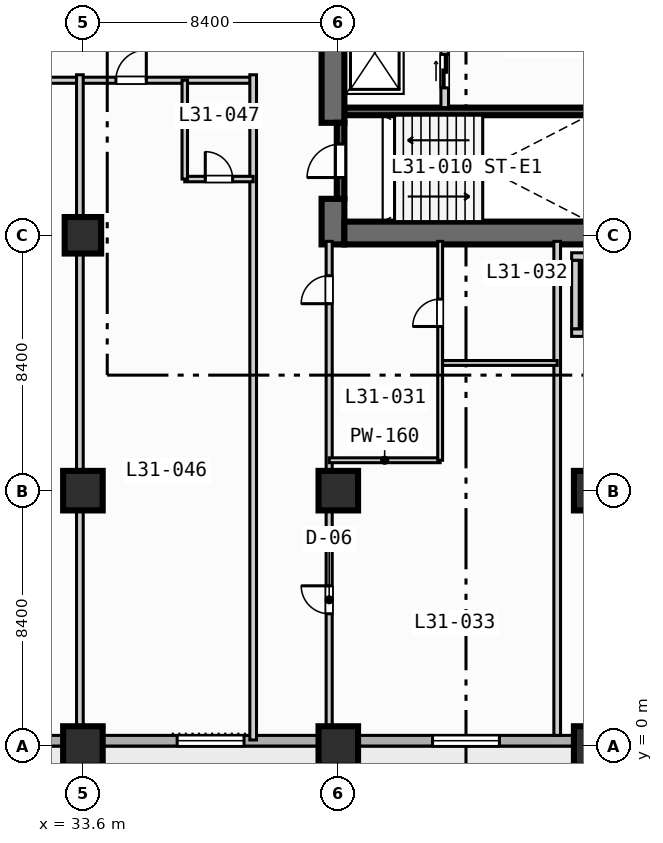
"""IFC4 building model, lengths in metres.
Left out: names, types, materials, properties, quantities, classifications, styles, units other than length and angle.
Written with IfcOpenShell. Run it as: python <this file> out.ifc"""

import sys

from ifc_helpers import new_model, si_unit, direction, frame, frame_2d, origin, origin_2d, place, context, subcontext, project, spatial, rectangle, extrude, element, fill, save


model = new_model("IFC4")
c1 = context("Model", 3, precision=1e-05, world=origin(), true_north=direction((0.0, 1.0)))
c2 = subcontext(c1, "Body", "Model", "MODEL_VIEW")
j1 = project(units=[si_unit("LENGTHUNIT", "METRE"), si_unit("PLANEANGLEUNIT", "RADIAN")], contexts=[c1])
p1 = place(None, origin())
s1 = spatial("IfcSite", under=j1, at=p1, CompositionType="ELEMENT")
p2 = place(p1, origin())
s2 = spatial("IfcBuilding", under=s1, at=p2, CompositionType="ELEMENT")
p3 = place(p2, frame((0.0, 0.0, 130.4)))
s3 = spatial("IfcBuildingStorey", under=s2, at=p3, CompositionType="ELEMENT", Elevation=130.4)
p4 = place(p3, frame((42.2, 20.875, 0.0), z_axis=(0.0, 0.0, 1.0), x_axis=(1.0, 0.0, 0.0)))
e1 = element("IfcWall", 1, at=p4, inside=s3, PredefinedType="SOLIDWALL", context=c2, shape_type="SweptSolid", body=[
    extrude(rectangle(XDim=8.05, YDim=0.25, at=frame_2d((4.025, 0.0))), origin(), (0.0, 0.0, 1.0), 3.55),
])
p5 = place(p3, frame((41.825, 16.5, 0.0), z_axis=(0.0, 0.0, 1.0), x_axis=(0.0, 1.0, 0.0)))
e2 = element("IfcWall", 2, at=p5, inside=s3, PredefinedType="SHEAR", context=c2, shape_type="SweptSolid", body=[
    extrude(rectangle(XDim=1.5, YDim=0.75, at=frame_2d((0.75, 0.0))), origin(), (0.0, 0.0, 1.0), 3.55),
])
p6 = place(p3, frame((41.825, 20.5, 0.0), z_axis=(0.0, 0.0, 1.0), x_axis=(0.0, 1.0, 0.0)))
e3 = element("IfcWall", 3, at=p6, inside=s3, PredefinedType="SHEAR", context=c2, shape_type="SweptSolid", body=[
    extrude(rectangle(XDim=5.075, YDim=0.75, at=frame_2d((2.538, 0.0))), origin(), (0.0, 0.0, 1.0), 3.55),
])
p7 = place(p3, frame((42.2, 16.875, 0.0), z_axis=(0.0, 0.0, 1.0), x_axis=(1.0, 0.0, 0.0)))
e4 = element("IfcWall", 4, at=p7, inside=s3, PredefinedType="SHEAR", context=c2, shape_type="SweptSolid", body=[
    extrude(rectangle(XDim=16.35, YDim=0.75, at=frame_2d((8.175, 0.0))), origin(), (0.0, 0.0, 1.0), 3.55),
])
for number, where, z_axis, x_axis in (
    (5, (33.6, 0.0, 0.0), (0.0, 0.0, 1.0), (1.0, 0.0, 0.0)),
    (6, (33.6, 8.4, 0.0), (0.0, 0.0, 1.0), (1.0, 0.0, 0.0)),
):
    element("IfcColumn", number, at=place(p3, frame(where, z_axis=z_axis, x_axis=x_axis)), inside=s3, PredefinedType="COLUMN", context=c2, shape_type="SweptSolid", body=[
        extrude(rectangle(XDim=1.3, YDim=1.3, at=origin_2d()), origin(), (0.0, 0.0, 1.0), 3.8),
    ])
p8 = place(p3, frame((33.6, 16.8, 0.0), z_axis=(0.0, 0.0, 1.0), x_axis=(1.0, 0.0, 0.0)))
e7 = element("IfcColumn", 7, at=p8, inside=s3, PredefinedType="COLUMN", context=c2, shape_type="SweptSolid", body=[
    extrude(rectangle(XDim=1.2, YDim=1.2, at=origin_2d()), origin(), (0.0, 0.0, 1.0), 3.8),
])
for number, where, z_axis, x_axis in (
    (8, (42.0, 0.0, 0.0), (0.0, 0.0, 1.0), (1.0, 0.0, 0.0)),
    (9, (42.0, 8.4, 0.0), (0.0, 0.0, 1.0), (1.0, 0.0, 0.0)),
    (10, (50.4, 0.0, 0.0), (0.0, 0.0, 1.0), (1.0, 0.0, 0.0)),
    (11, (50.4, 8.4, 0.0), (0.0, 0.0, 1.0), (1.0, 0.0, 0.0)),
):
    element("IfcColumn", number, at=place(p3, frame(where, z_axis=z_axis, x_axis=x_axis)), inside=s3, PredefinedType="COLUMN", context=c2, shape_type="SweptSolid", body=[
        extrude(rectangle(XDim=1.3, YDim=1.3, at=origin_2d()), origin(), (0.0, 0.0, 1.0), 3.8),
    ])
p9 = place(p3, frame((72.425, 0.175, 0.0), z_axis=(0.0, 0.0, 1.0), x_axis=(-1.0, 0.0, 0.0)))
e12 = element("IfcWall", 12, at=p9, inside=s3, PredefinedType="STANDARD", context=c2, shape_type="SweptSolid", body=[
    extrude(rectangle(XDim=69.25, YDim=0.35, at=frame_2d((34.625, 0.0))), origin(), (0.0, 0.0, 1.0), 3.55),
])
p10 = place(p9, frame((50.725, 0.0, 0.0)))
e13 = element("IfcOpeningElement", 13, at=p10, cuts=e12, PredefinedType="OPENING", context=c2, shape_type="SweptSolid", body=[
    extrude(rectangle(XDim=1.4, YDim=2.2, at=frame_2d((0.7, 1.1))), frame((0.0, 0.185, 0.0), z_axis=(0.0, -1.0, 0.0), x_axis=(1.0, 0.0, 0.0)), (0.0, 0.0, 1.0), 0.37),
])
p11 = place(p9, frame((58.725, 0.0, 0.85)))
e14 = element("IfcOpeningElement", 14, at=p11, cuts=e12, PredefinedType="OPENING", context=c2, shape_type="SweptSolid", body=[
    extrude(rectangle(XDim=2.2, YDim=1.8, at=frame_2d((1.1, 0.9))), frame((0.0, 0.185, 0.0), z_axis=(0.0, -1.0, 0.0), x_axis=(1.0, 0.0, 0.0)), (0.0, 0.0, 1.0), 0.37),
])
p12 = place(p9, frame((41.925, 0.0, 0.85)))
e15 = element("IfcOpeningElement", 15, at=p12, cuts=e12, PredefinedType="OPENING", context=c2, shape_type="SweptSolid", body=[
    extrude(rectangle(XDim=2.2, YDim=1.8, at=frame_2d((1.1, 0.9))), frame((0.0, 0.185, 0.0), z_axis=(0.0, -1.0, 0.0), x_axis=(1.0, 0.0, 0.0)), (0.0, 0.0, 1.0), 0.37),
])
p13 = place(p9, frame((33.525, 0.0, 0.85)))
e16 = element("IfcOpeningElement", 16, at=p13, cuts=e12, PredefinedType="OPENING", context=c2, shape_type="SweptSolid", body=[
    extrude(rectangle(XDim=2.2, YDim=1.8, at=frame_2d((1.1, 0.9))), frame((0.0, 0.185, 0.0), z_axis=(0.0, -1.0, 0.0), x_axis=(1.0, 0.0, 0.0)), (0.0, 0.0, 1.0), 0.37),
])
p14 = place(p9, frame((25.125, 0.0, 0.85)))
e17 = element("IfcOpeningElement", 17, at=p14, cuts=e12, PredefinedType="OPENING", context=c2, shape_type="SweptSolid", body=[
    extrude(rectangle(XDim=2.2, YDim=1.8, at=frame_2d((1.1, 0.9))), frame((0.0, 0.185, 0.0), z_axis=(0.0, -1.0, 0.0), x_axis=(1.0, 0.0, 0.0)), (0.0, 0.0, 1.0), 0.37),
])
p15 = place(p9, frame((64.825, 0.0, 0.85)))
e18 = element("IfcOpeningElement", 18, at=p15, cuts=e12, PredefinedType="OPENING", context=c2, shape_type="SweptSolid", body=[
    extrude(rectangle(XDim=1.8, YDim=1.8, at=frame_2d((0.9, 0.9))), frame((0.0, 0.185, 0.0), z_axis=(0.0, -1.0, 0.0), x_axis=(1.0, 0.0, 0.0)), (0.0, 0.0, 1.0), 0.37),
])
p16 = place(p9, frame((48.025, 0.0, 0.85)))
e19 = element("IfcOpeningElement", 19, at=p16, cuts=e12, PredefinedType="OPENING", context=c2, shape_type="SweptSolid", body=[
    extrude(rectangle(XDim=1.8, YDim=1.8, at=frame_2d((0.9, 0.9))), frame((0.0, 0.185, 0.0), z_axis=(0.0, -1.0, 0.0), x_axis=(1.0, 0.0, 0.0)), (0.0, 0.0, 1.0), 0.37),
])
p17 = place(p3, frame((42.075, 18.0, 0.0), z_axis=(0.0, 0.0, 1.0), x_axis=(0.0, 1.0, 0.0)))
e20 = element("IfcWall", 20, at=p17, inside=s3, PredefinedType="SOLIDWALL", context=c2, shape_type="SweptSolid", body=[
    extrude(rectangle(XDim=2.5, YDim=0.25, at=frame_2d((1.25, 0.0))), origin(), (0.0, 0.0, 1.0), 3.55),
])
p18 = place(p17, frame((0.7, 0.0, 0.0)))
e21 = element("IfcOpeningElement", 21, at=p18, cuts=e20, PredefinedType="OPENING", context=c2, shape_type="SweptSolid", body=[
    extrude(rectangle(XDim=1.1, YDim=2.15, at=frame_2d((0.55, 1.075))), frame((0.0, 0.135, 0.0), z_axis=(0.0, -1.0, 0.0), x_axis=(1.0, 0.0, 0.0)), (0.0, 0.0, 1.0), 0.27),
])
p19 = place(p3, frame((45.5, 21.0, 0.0), z_axis=(0.0, 0.0, 1.0), x_axis=(0.0, 1.0, 0.0)))
e22 = element("IfcWall", 22, at=p19, inside=s3, PredefinedType="SOLIDWALL", context=c2, shape_type="SweptSolid", body=[
    extrude(rectangle(XDim=4.15, YDim=0.25, at=frame_2d((2.075, 0.0))), origin(), (0.0, 0.0, 1.0), 3.55),
])
p20 = place(p19, frame((0.65, 0.0, 0.0)))
e23 = element("IfcOpeningElement", 23, at=p20, cuts=e22, PredefinedType="OPENING", context=c2, shape_type="SweptSolid", body=[
    extrude(rectangle(XDim=1.1, YDim=2.15, at=frame_2d((0.55, 1.075))), frame((0.0, 0.135, 0.0), z_axis=(0.0, -1.0, 0.0), x_axis=(1.0, 0.0, 0.0)), (0.0, 0.0, 1.0), 0.27),
])
p21 = place(p3, frame((49.675, 13.6, 0.0), z_axis=(0.0, 0.0, 1.0), x_axis=(1.0, 0.0, 0.0)))
e24 = element("IfcWall", 24, at=p21, inside=s3, PredefinedType="SOLIDWALL", context=c2, shape_type="SweptSolid", body=[
    extrude(rectangle(XDim=2.25, YDim=0.25, at=frame_2d((1.125, 0.0))), origin(), (0.0, 0.0, 1.0), 3.55),
])
p22 = place(p21, frame((0.4, 0.0, 0.0)))
e25 = element("IfcOpeningElement", 25, at=p22, cuts=e24, PredefinedType="OPENING", context=c2, shape_type="SweptSolid", body=[
    extrude(rectangle(XDim=1.1, YDim=2.15, at=frame_2d((0.55, 1.075))), frame((0.0, 0.135, 0.0), z_axis=(0.0, -1.0, 0.0), x_axis=(1.0, 0.0, 0.0)), (0.0, 0.0, 1.0), 0.27),
])
for number, where, z_axis, x_axis in (
    (26, (49.675, 16.1, 0.0), (0.0, 0.0, 1.0), (1.0, 0.0, 0.0)),
    (27, (49.8, 13.725, 0.0), (0.0, 0.0, 1.0), (0.0, 1.0, 0.0)),
):
    element("IfcWall", number, at=place(p3, frame(where, z_axis=z_axis, x_axis=x_axis)), inside=s3, PredefinedType="SOLIDWALL", context=c2, shape_type="SweptSolid", body=[
        extrude(rectangle(XDim=2.25, YDim=0.25, at=frame_2d((1.125, 0.0))), origin(), (0.0, 0.0, 1.0), 3.55),
    ])
p23 = place(p3, frame((41.7, 0.35, 0.0), z_axis=(0.0, 0.0, 1.0), x_axis=(0.0, 1.0, 0.0)))
e28 = element("IfcWall", 28, at=p23, inside=s3, PredefinedType="PARTITIONING", context=c2, shape_type="SweptSolid", body=[
    extrude(rectangle(XDim=16.25, YDim=0.2, at=frame_2d((8.125, 0.0))), origin(), (0.0, 0.0, 1.0), 2.8),
])
p24 = place(p23, frame((4.0, 0.0, 0.0)))
e29 = element("IfcOpeningElement", 29, at=p24, cuts=e28, PredefinedType="OPENING", context=c2, shape_type="SweptSolid", body=[
    extrude(rectangle(XDim=0.92, YDim=2.1, at=frame_2d((0.46, 1.05))), frame((0.0, 0.11, 0.0), z_axis=(0.0, -1.0, 0.0), x_axis=(1.0, 0.0, 0.0)), (0.0, 0.0, 1.0), 0.22),
])
p25 = place(p23, frame((14.2, 0.0, 0.0)))
e30 = element("IfcOpeningElement", 30, at=p25, cuts=e28, PredefinedType="OPENING", context=c2, shape_type="SweptSolid", body=[
    extrude(rectangle(XDim=0.92, YDim=2.1, at=frame_2d((0.46, 1.05))), frame((0.0, 0.11, 0.0), z_axis=(0.0, -1.0, 0.0), x_axis=(1.0, 0.0, 0.0)), (0.0, 0.0, 1.0), 0.22),
])
p26 = place(p3, frame((49.2, 0.35, 0.0), z_axis=(0.0, 0.0, 1.0), x_axis=(0.0, 1.0, 0.0)))
e31 = element("IfcWall", 31, at=p26, inside=s3, PredefinedType="PARTITIONING", context=c2, shape_type="SweptSolid", body=[
    extrude(rectangle(XDim=16.25, YDim=0.22, at=frame_2d((8.125, 0.0))), origin(), (0.0, 0.0, 1.0), 3.55),
])
p27 = place(p3, frame((41.7, 9.4, 0.0), z_axis=(0.0, 0.0, 1.0), x_axis=(1.0, 0.0, 0.0)))
e32 = element("IfcWall", 32, at=p27, inside=s3, PredefinedType="PARTITIONING", context=c2, shape_type="SweptSolid", body=[
    extrude(rectangle(XDim=3.65, YDim=0.16, at=frame_2d((1.825, 0.0))), origin(), (0.0, 0.0, 1.0), 3.55),
])
p28 = place(p3, frame((45.35, 12.6, 0.0), z_axis=(0.0, 0.0, 1.0), x_axis=(1.0, 0.0, 0.0)))
e33 = element("IfcWall", 33, at=p28, inside=s3, PredefinedType="PARTITIONING", context=c2, shape_type="SweptSolid", body=[
    extrude(rectangle(XDim=3.85, YDim=0.16, at=frame_2d((1.925, 0.0))), origin(), (0.0, 0.0, 1.0), 3.55),
])
p29 = place(p3, frame((45.35, 9.4, 0.0), z_axis=(0.0, 0.0, 1.0), x_axis=(0.0, 1.0, 0.0)))
e34 = element("IfcWall", 34, at=p29, inside=s3, PredefinedType="PARTITIONING", context=c2, shape_type="SweptSolid", body=[
    extrude(rectangle(XDim=7.2, YDim=0.16, at=frame_2d((3.6, 0.0))), origin(), (0.0, 0.0, 1.0), 3.55),
])
p30 = place(p29, frame((4.4, 0.0, 0.0)))
e35 = element("IfcOpeningElement", 35, at=p30, cuts=e34, PredefinedType="OPENING", context=c2, shape_type="SweptSolid", body=[
    extrude(rectangle(XDim=0.9, YDim=2.1, at=frame_2d((0.45, 1.05))), frame((0.0, 0.09, 0.0), z_axis=(0.0, -1.0, 0.0), x_axis=(1.0, 0.0, 0.0)), (0.0, 0.0, 1.0), 0.18),
])
p31 = place(p3, frame((3.4, 21.9, 0.0), z_axis=(0.0, 0.0, 1.0), x_axis=(1.0, 0.0, 0.0)))
e36 = element("IfcWall", 36, at=p31, inside=s3, PredefinedType="PARTITIONING", context=c2, shape_type="SweptSolid", body=[
    extrude(rectangle(XDim=35.8, YDim=0.2, at=frame_2d((17.9, 0.0))), origin(), (0.0, 0.0, 1.0), 3.55),
])
p32 = place(p31, frame((3.965, 0.0, 0.0)))
e37 = element("IfcOpeningElement", 37, at=p32, cuts=e36, PredefinedType="OPENING", context=c2, shape_type="SweptSolid", body=[
    extrude(rectangle(XDim=1.0, YDim=2.15, at=frame_2d((0.5, 1.075))), frame((0.0, 0.11, 0.0), z_axis=(0.0, -1.0, 0.0), x_axis=(1.0, 0.0, 0.0)), (0.0, 0.0, 1.0), 0.22),
])
p33 = place(p31, frame((10.565, 0.0, 0.0)))
e38 = element("IfcOpeningElement", 38, at=p33, cuts=e36, PredefinedType="OPENING", context=c2, shape_type="SweptSolid", body=[
    extrude(rectangle(XDim=1.0, YDim=2.15, at=frame_2d((0.5, 1.075))), frame((0.0, 0.11, 0.0), z_axis=(0.0, -1.0, 0.0), x_axis=(1.0, 0.0, 0.0)), (0.0, 0.0, 1.0), 0.22),
])
p34 = place(p31, frame((14.34, 0.0, 0.0)))
e39 = element("IfcOpeningElement", 39, at=p34, cuts=e36, PredefinedType="OPENING", context=c2, shape_type="SweptSolid", body=[
    extrude(rectangle(XDim=1.0, YDim=2.15, at=frame_2d((0.5, 1.075))), frame((0.0, 0.11, 0.0), z_axis=(0.0, -1.0, 0.0), x_axis=(1.0, 0.0, 0.0)), (0.0, 0.0, 1.0), 0.22),
])
p35 = place(p31, frame((22.26, 0.0, 0.0)))
e40 = element("IfcOpeningElement", 40, at=p35, cuts=e36, PredefinedType="OPENING", context=c2, shape_type="SweptSolid", body=[
    extrude(rectangle(XDim=1.0, YDim=2.15, at=frame_2d((0.5, 1.075))), frame((0.0, 0.11, 0.0), z_axis=(0.0, -1.0, 0.0), x_axis=(1.0, 0.0, 0.0)), (0.0, 0.0, 1.0), 0.22),
])
p36 = place(p31, frame((27.915, 0.0, 0.0)))
e41 = element("IfcOpeningElement", 41, at=p36, cuts=e36, PredefinedType="OPENING", context=c2, shape_type="SweptSolid", body=[
    extrude(rectangle(XDim=1.0, YDim=2.15, at=frame_2d((0.5, 1.075))), frame((0.0, 0.11, 0.0), z_axis=(0.0, -1.0, 0.0), x_axis=(1.0, 0.0, 0.0)), (0.0, 0.0, 1.0), 0.22),
])
p37 = place(p31, frame((31.285, 0.0, 0.0)))
e42 = element("IfcOpeningElement", 42, at=p37, cuts=e36, PredefinedType="OPENING", context=c2, shape_type="SweptSolid", body=[
    extrude(rectangle(XDim=1.0, YDim=2.15, at=frame_2d((0.5, 1.075))), frame((0.0, 0.11, 0.0), z_axis=(0.0, -1.0, 0.0), x_axis=(1.0, 0.0, 0.0)), (0.0, 0.0, 1.0), 0.22),
])
p38 = place(p3, frame((33.5, 0.2, 0.0), z_axis=(0.0, 0.0, 1.0), x_axis=(0.0, 1.0, 0.0)))
e43 = element("IfcWall", 43, at=p38, inside=s3, PredefinedType="PARTITIONING", context=c2, shape_type="SweptSolid", body=[
    extrude(rectangle(XDim=21.88, YDim=0.22, at=frame_2d((10.94, 0.0))), origin(), (0.0, 0.0, 1.0), 2.8),
])
p39 = place(p3, frame((39.2, 0.2, 0.0), z_axis=(0.0, 0.0, 1.0), x_axis=(0.0, 1.0, 0.0)))
e44 = element("IfcWall", 44, at=p39, inside=s3, PredefinedType="PARTITIONING", context=c2, shape_type="SweptSolid", body=[
    extrude(rectangle(XDim=21.88, YDim=0.22, at=frame_2d((10.94, 0.0))), origin(), (0.0, 0.0, 1.0), 3.55),
])
p40 = place(p3, frame((36.95, 18.65, 0.0), z_axis=(0.0, 0.0, 1.0), x_axis=(1.0, 0.0, 0.0)))
e45 = element("IfcWall", 45, at=p40, inside=s3, PredefinedType="PLUMBINGWALL", context=c2, shape_type="SweptSolid", body=[
    extrude(rectangle(XDim=2.25, YDim=0.18, at=frame_2d((1.125, 0.0))), origin(), (0.0, 0.0, 1.0), 3.55),
])
p41 = place(p40, frame((0.675, 0.0, 0.0)))
e46 = element("IfcOpeningElement", 46, at=p41, cuts=e45, PredefinedType="OPENING", context=c2, shape_type="SweptSolid", body=[
    extrude(rectangle(XDim=0.9, YDim=2.1, at=frame_2d((0.45, 1.05))), frame((0.0, 0.1, 0.0), z_axis=(0.0, -1.0, 0.0), x_axis=(1.0, 0.0, 0.0)), (0.0, 0.0, 1.0), 0.2),
])
p42 = place(p3, frame((36.95, 18.65, 0.0), z_axis=(0.0, 0.0, 1.0), x_axis=(0.0, 1.0, 0.0)))
e47 = element("IfcWall", 47, at=p42, inside=s3, PredefinedType="PLUMBINGWALL", context=c2, shape_type="SweptSolid", body=[
    extrude(rectangle(XDim=3.25, YDim=0.18, at=frame_2d((1.625, 0.0))), origin(), (0.0, 0.0, 1.0), 3.55),
])
p43 = place(p13, origin())
e48 = element("IfcWindow", 48, at=p43, inside=s3, PartitioningType="SINGLE_PANEL", PredefinedType="WINDOW", context=c2, shape_type="SweptSolid", body=[
    extrude(rectangle(XDim=2.2, YDim=1.8, at=frame_2d((1.1, 0.9))), frame((0.0, 0.03, 0.0), z_axis=(0.0, -1.0, 0.0), x_axis=(1.0, 0.0, 0.0)), (0.0, 0.0, 1.0), 0.06),
])
fill(e16, e48)
p44 = place(p14, origin())
e49 = element("IfcWindow", 49, at=p44, inside=s3, PartitioningType="SINGLE_PANEL", PredefinedType="WINDOW", context=c2, shape_type="SweptSolid", body=[
    extrude(rectangle(XDim=2.2, YDim=1.8, at=frame_2d((1.1, 0.9))), frame((0.0, 0.03, 0.0), z_axis=(0.0, -1.0, 0.0), x_axis=(1.0, 0.0, 0.0)), (0.0, 0.0, 1.0), 0.06),
])
fill(e17, e49)
p45 = place(p18, origin())
e50 = element("IfcDoor", 50, at=p45, inside=s3, OperationType="SINGLE_SWING_LEFT", PredefinedType="DOOR", context=c2, shape_type="SweptSolid", body=[
    extrude(rectangle(XDim=1.1, YDim=2.15, at=frame_2d((0.55, 1.075))), frame((0.0, 0.025, 0.0), z_axis=(0.0, -1.0, 0.0), x_axis=(1.0, 0.0, 0.0)), (0.0, 0.0, 1.0), 0.05),
])
fill(e21, e50)
p46 = place(p20, origin())
e51 = element("IfcDoor", 51, at=p46, inside=s3, OperationType="SLIDING_TO_LEFT", PredefinedType="DOOR", context=c2, shape_type="SweptSolid", body=[
    extrude(rectangle(XDim=1.1, YDim=2.15, at=frame_2d((0.55, 1.075))), frame((0.0, 0.025, 0.0), z_axis=(0.0, -1.0, 0.0), x_axis=(1.0, 0.0, 0.0)), (0.0, 0.0, 1.0), 0.05),
])
fill(e23, e51)
p47 = place(p24, origin())
e52 = element("IfcDoor", 52, at=p47, inside=s3, OperationType="SINGLE_SWING_RIGHT", PredefinedType="DOOR", context=c2, shape_type="SweptSolid", body=[
    extrude(rectangle(XDim=0.92, YDim=2.1, at=frame_2d((0.46, 1.05))), frame((0.0, 0.025, 0.0), z_axis=(0.0, -1.0, 0.0), x_axis=(1.0, 0.0, 0.0)), (0.0, 0.0, 1.0), 0.05),
])
fill(e29, e52)
p48 = place(p25, origin())
e53 = element("IfcDoor", 53, at=p48, inside=s3, OperationType="SINGLE_SWING_LEFT", PredefinedType="DOOR", context=c2, shape_type="SweptSolid", body=[
    extrude(rectangle(XDim=0.92, YDim=2.1, at=frame_2d((0.46, 1.05))), frame((0.0, 0.025, 0.0), z_axis=(0.0, -1.0, 0.0), x_axis=(1.0, 0.0, 0.0)), (0.0, 0.0, 1.0), 0.05),
])
fill(e30, e53)
p49 = place(p30, origin())
e54 = element("IfcDoor", 54, at=p49, inside=s3, OperationType="SINGLE_SWING_LEFT", PredefinedType="DOOR", context=c2, shape_type="SweptSolid", body=[
    extrude(rectangle(XDim=0.9, YDim=2.1, at=frame_2d((0.45, 1.05))), frame((0.0, 0.025, 0.0), z_axis=(0.0, -1.0, 0.0), x_axis=(1.0, 0.0, 0.0)), (0.0, 0.0, 1.0), 0.05),
])
fill(e35, e54)
p50 = place(p37, origin())
e55 = element("IfcDoor", 55, at=p50, inside=s3, OperationType="SINGLE_SWING_RIGHT", PredefinedType="DOOR", context=c2, shape_type="SweptSolid", body=[
    extrude(rectangle(XDim=1.0, YDim=2.15, at=frame_2d((0.5, 1.075))), frame((0.0, 0.025, 0.0), z_axis=(0.0, -1.0, 0.0), x_axis=(1.0, 0.0, 0.0)), (0.0, 0.0, 1.0), 0.05),
])
fill(e42, e55)
p51 = place(p41, origin())
e56 = element("IfcDoor", 56, at=p51, inside=s3, OperationType="SINGLE_SWING_LEFT", PredefinedType="DOOR", context=c2, shape_type="SweptSolid", body=[
    extrude(rectangle(XDim=0.9, YDim=2.1, at=frame_2d((0.45, 1.05))), frame((0.0, 0.025, 0.0), z_axis=(0.0, -1.0, 0.0), x_axis=(1.0, 0.0, 0.0)), (0.0, 0.0, 1.0), 0.05),
])
fill(e46, e56)
save(model, sys.argv[1])
